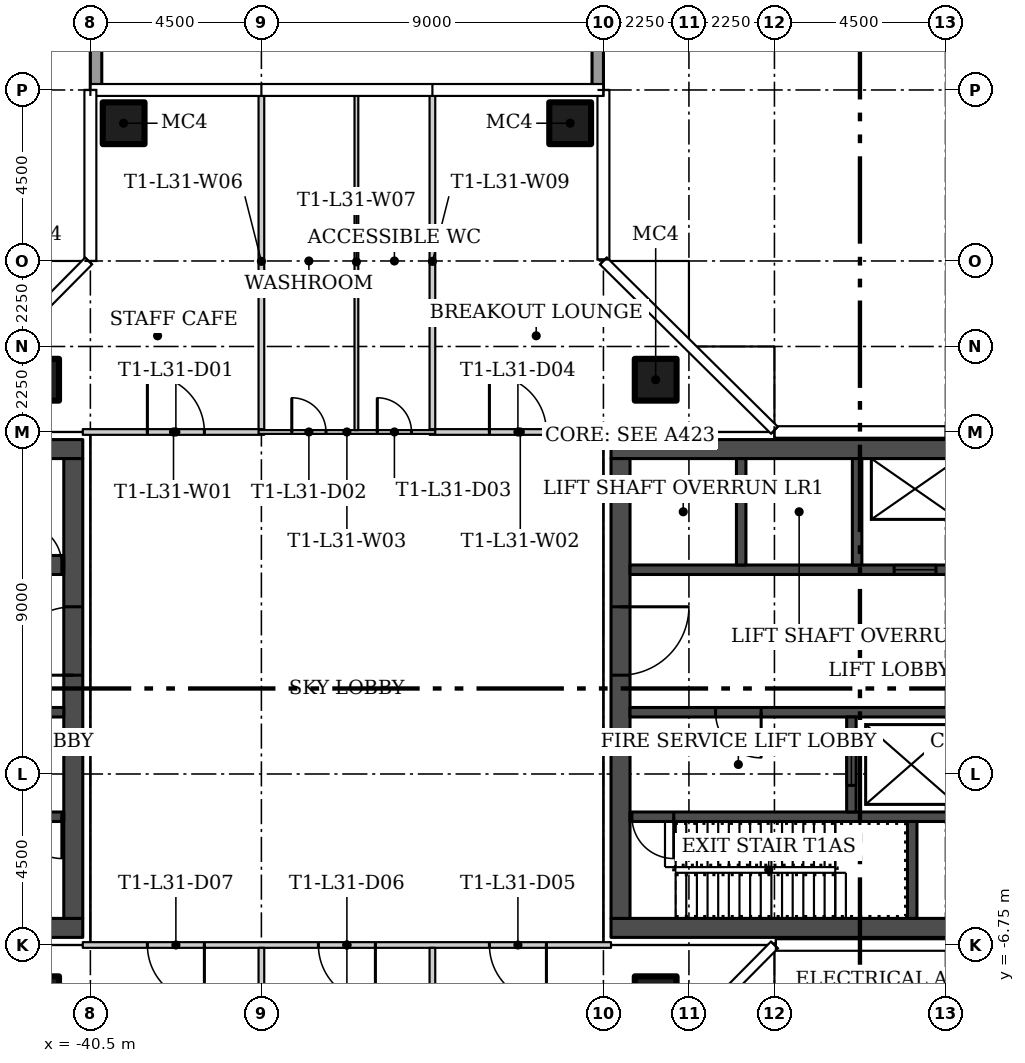
"""IFC4 building model, lengths in metres.
Left out: names, types, materials, properties, quantities, classifications, styles, units other than length and angle.
Written with IfcOpenShell. Run it as: python <this file> out.ifc"""

import sys

from ifc_helpers import new_model, si_unit, direction, frame, frame_2d, origin, origin_2d, place, context, subcontext, project, spatial, rectangle, hollow_rectangle, extrude, element, fill, save


model = new_model("IFC4")
c1 = context("Model", 3, precision=1e-05, world=origin(), true_north=direction((0.0, 1.0)))
c2 = subcontext(c1, "Body", "Model", "MODEL_VIEW")
j1 = project(units=[si_unit("LENGTHUNIT", "METRE"), si_unit("PLANEANGLEUNIT", "RADIAN")], contexts=[c1])
p1 = place(None, origin())
s1 = spatial("IfcSite", under=j1, at=p1, CompositionType="ELEMENT")
p2 = place(p1, origin())
s2 = spatial("IfcBuilding", under=s1, at=p2, CompositionType="ELEMENT")
p3 = place(p2, frame((0.0, 0.0, 133.5)))
s3 = spatial("IfcBuildingStorey", under=s2, at=p3, CompositionType="ELEMENT", Elevation=133.5)
for number, where in (
    (1, (-25.625, 8.125, 0.0)),
    (2, (-25.625, -8.125, 0.0)),
    (3, (-41.875, 8.125, 0.0)),
    (4, (-41.875, -8.125, 0.0)),
    (5, (-39.625, 14.875, 0.0)),
    (6, (-27.875, 14.875, 0.0)),
):
    element("IfcColumn", number, at=place(p3, frame(where)), inside=s3, PredefinedType="COLUMN", context=c2, shape_type="SweptSolid", body=[
        extrude(hollow_rectangle(XDim=1.1, YDim=1.1, WallThickness=0.04, at=origin_2d()), origin(), (0.0, 0.0, 1.0), 5.05),
    ])
p4 = place(p3, frame((-40.7, 6.75, 0.0)))
e7 = element("IfcWall", 7, at=p4, inside=s3, PredefinedType="PARTITIONING", context=c2, shape_type="SweptSolid", body=[
    extrude(rectangle(XDim=4.775, YDim=0.15, at=frame_2d((2.387, 0.0))), origin(), (0.0, 0.0, 1.0), 5.05),
])
p5 = place(p4, frame((1.7, 0.0, 0.0)))
e8 = element("IfcOpeningElement", 8, at=p5, cuts=e7, PredefinedType="OPENING", context=c2, shape_type="SweptSolid", body=[
    extrude(rectangle(XDim=1.5, YDim=2.1, at=frame_2d((0.75, 1.05))), frame((0.0, 0.085, 0.0), z_axis=(0.0, -1.0, 0.0), x_axis=(1.0, 0.0, 0.0)), (0.0, 0.0, 1.0), 0.17),
])
p6 = place(p3, frame((-31.575, 6.75, 0.0)))
e9 = element("IfcWall", 9, at=p6, inside=s3, PredefinedType="PARTITIONING", context=c2, shape_type="SweptSolid", body=[
    extrude(rectangle(XDim=4.775, YDim=0.15, at=frame_2d((2.387, 0.0))), origin(), (0.0, 0.0, 1.0), 5.05),
])
p7 = place(p6, frame((1.575, 0.0, 0.0)))
e10 = element("IfcOpeningElement", 10, at=p7, cuts=e9, PredefinedType="OPENING", context=c2, shape_type="SweptSolid", body=[
    extrude(rectangle(XDim=1.5, YDim=2.1, at=frame_2d((0.75, 1.05))), frame((0.0, 0.085, 0.0), z_axis=(0.0, -1.0, 0.0), x_axis=(1.0, 0.0, 0.0)), (0.0, 0.0, 1.0), 0.17),
])
p8 = place(p3, frame((-36.075, 6.75, 0.0)))
e11 = element("IfcWall", 11, at=p8, inside=s3, PredefinedType="PARTITIONING", context=c2, shape_type="SweptSolid", body=[
    extrude(rectangle(XDim=4.65, YDim=0.1, at=frame_2d((2.325, 0.0))), origin(), (0.0, 0.0, 1.0), 5.05),
])
p9 = place(p8, frame((0.875, 0.0, 0.0)))
e12 = element("IfcOpeningElement", 12, at=p9, cuts=e11, PredefinedType="OPENING", context=c2, shape_type="SweptSolid", body=[
    extrude(rectangle(XDim=0.9, YDim=2.1, at=frame_2d((0.45, 1.05))), frame((0.0, 0.06, 0.0), z_axis=(0.0, -1.0, 0.0), x_axis=(1.0, 0.0, 0.0)), (0.0, 0.0, 1.0), 0.12),
])
p10 = place(p8, frame((3.125, 0.0, 0.0)))
e13 = element("IfcOpeningElement", 13, at=p10, cuts=e11, PredefinedType="OPENING", context=c2, shape_type="SweptSolid", body=[
    extrude(rectangle(XDim=0.9, YDim=2.1, at=frame_2d((0.45, 1.05))), frame((0.0, 0.06, 0.0), z_axis=(0.0, -1.0, 0.0), x_axis=(1.0, 0.0, 0.0)), (0.0, 0.0, 1.0), 0.12),
])
p11 = place(p3, frame((-26.8, -6.75, 0.0), z_axis=(0.0, 0.0, 1.0), x_axis=(-1.0, 0.0, 0.0)))
e14 = element("IfcWall", 14, at=p11, inside=s3, PredefinedType="PARTITIONING", context=c2, shape_type="SweptSolid", body=[
    extrude(rectangle(XDim=13.9, YDim=0.15, at=frame_2d((6.95, 0.0))), origin(), (0.0, 0.0, 1.0), 5.05),
])
p12 = place(p11, frame((1.7, 0.0, 0.0)))
e15 = element("IfcOpeningElement", 15, at=p12, cuts=e14, PredefinedType="OPENING", context=c2, shape_type="SweptSolid", body=[
    extrude(rectangle(XDim=1.5, YDim=2.1, at=frame_2d((0.75, 1.05))), frame((0.0, 0.085, 0.0), z_axis=(0.0, -1.0, 0.0), x_axis=(1.0, 0.0, 0.0)), (0.0, 0.0, 1.0), 0.17),
])
p13 = place(p11, frame((6.2, 0.0, 0.0)))
e16 = element("IfcOpeningElement", 16, at=p13, cuts=e14, PredefinedType="OPENING", context=c2, shape_type="SweptSolid", body=[
    extrude(rectangle(XDim=1.5, YDim=2.1, at=frame_2d((0.75, 1.05))), frame((0.0, 0.085, 0.0), z_axis=(0.0, -1.0, 0.0), x_axis=(1.0, 0.0, 0.0)), (0.0, 0.0, 1.0), 0.17),
])
p14 = place(p11, frame((10.7, 0.0, 0.0)))
e17 = element("IfcOpeningElement", 17, at=p14, cuts=e14, PredefinedType="OPENING", context=c2, shape_type="SweptSolid", body=[
    extrude(rectangle(XDim=1.5, YDim=2.1, at=frame_2d((0.75, 1.05))), frame((0.0, 0.085, 0.0), z_axis=(0.0, -1.0, 0.0), x_axis=(1.0, 0.0, 0.0)), (0.0, 0.0, 1.0), 0.17),
])
p15 = place(p3, frame((-36.0, -20.155, 0.0), z_axis=(0.0, 0.0, 1.0), x_axis=(0.0, 1.0, 0.0)))
e18 = element("IfcWall", 18, at=p15, inside=s3, PredefinedType="PARTITIONING", context=c2, shape_type="SweptSolid", body=[
    extrude(rectangle(XDim=13.33, YDim=0.15, at=frame_2d((6.665, 0.0))), origin(), (0.0, 0.0, 1.0), 5.05),
])
p16 = place(p3, frame((-36.0, 6.825, 0.0), z_axis=(0.0, 0.0, 1.0), x_axis=(0.0, 1.0, 0.0)))
e19 = element("IfcWall", 19, at=p16, inside=s3, PredefinedType="PARTITIONING", context=c2, shape_type="SweptSolid", body=[
    extrude(rectangle(XDim=8.83, YDim=0.15, at=frame_2d((4.415, 0.0))), origin(), (0.0, 0.0, 1.0), 5.05),
])
p17 = place(p3, frame((-33.5, 6.8, 0.0), z_axis=(0.0, 0.0, 1.0), x_axis=(0.0, 1.0, 0.0)))
e20 = element("IfcWall", 20, at=p17, inside=s3, PredefinedType="PARTITIONING", context=c2, shape_type="SweptSolid", body=[
    extrude(rectangle(XDim=8.855, YDim=0.1, at=frame_2d((4.427, 0.0))), origin(), (0.0, 0.0, 1.0), 5.05),
])
p18 = place(p3, frame((-31.5, -20.155, 0.0), z_axis=(0.0, 0.0, 1.0), x_axis=(0.0, 1.0, 0.0)))
e21 = element("IfcWall", 21, at=p18, inside=s3, PredefinedType="PARTITIONING", context=c2, shape_type="SweptSolid", body=[
    extrude(rectangle(XDim=13.33, YDim=0.15, at=frame_2d((6.665, 0.0))), origin(), (0.0, 0.0, 1.0), 5.05),
])
p19 = place(p3, frame((-31.5, 6.825, 0.0), z_axis=(0.0, 0.0, 1.0), x_axis=(0.0, 1.0, 0.0)))
e22 = element("IfcWall", 22, at=p19, inside=s3, PredefinedType="PARTITIONING", context=c2, shape_type="SweptSolid", body=[
    extrude(rectangle(XDim=8.83, YDim=0.15, at=frame_2d((4.415, 0.0))), origin(), (0.0, 0.0, 1.0), 5.05),
])
p20 = place(p3, frame((-27.15, 15.75, 0.0), z_axis=(0.0, 0.0, 1.0), x_axis=(0.0, 1.0, 0.0)))
e23 = element("IfcWall", 23, at=p20, inside=s3, PredefinedType="PARAPET", context=c2, shape_type="SweptSolid", body=[
    extrude(rectangle(XDim=4.5, YDim=0.3, at=frame_2d((2.25, 0.0))), origin(), (0.0, 0.0, 1.0), 1.1),
])
p21 = place(p3, frame((-40.35, 19.95, 0.0), z_axis=(0.0, 0.0, 1.0), x_axis=(0.0, -1.0, 0.0)))
e24 = element("IfcWall", 24, at=p21, inside=s3, PredefinedType="PARAPET", context=c2, shape_type="SweptSolid", body=[
    extrude(rectangle(XDim=4.2, YDim=0.3, at=frame_2d((2.1, 0.0))), origin(), (0.0, 0.0, 1.0), 1.1),
])
for number, where in (
    (25, (-26.8, -6.3, 0.0)),
    (26, (-26.8, 6.3, 0.0)),
):
    element("IfcWall", number, at=place(p3, frame(where)), inside=s3, PredefinedType="SHEAR", context=c2, shape_type="SweptSolid", body=[
        extrude(rectangle(XDim=13.1, YDim=0.5, at=frame_2d((6.55, 0.0))), origin(), (0.0, 0.0, 1.0), 5.05),
    ])
p22 = place(p3, frame((-26.55, 6.05, 0.0), z_axis=(0.0, 0.0, 1.0), x_axis=(0.0, -1.0, 0.0)))
e27 = element("IfcWall", 27, at=p22, inside=s3, PredefinedType="SHEAR", context=c2, shape_type="SweptSolid", body=[
    extrude(rectangle(XDim=12.1, YDim=0.5, at=frame_2d((6.05, 0.0))), origin(), (0.0, 0.0, 1.0), 5.05),
])
p23 = place(p22, frame((3.9, 0.0, 0.0)))
e28 = element("IfcOpeningElement", 28, at=p23, cuts=e27, PredefinedType="OPENING", context=c2, shape_type="SweptSolid", body=[
    extrude(rectangle(XDim=1.8, YDim=2.4, at=frame_2d((0.9, 1.2))), frame((0.0, 0.26, 0.0), z_axis=(0.0, -1.0, 0.0), x_axis=(1.0, 0.0, 0.0)), (0.0, 0.0, 1.0), 0.52),
])
p24 = place(p3, frame((-14.2, -3.375, 0.0), z_axis=(0.0, 0.0, 1.0), x_axis=(-1.0, 0.0, 0.0)))
e29 = element("IfcWall", 29, at=p24, inside=s3, PredefinedType="SHEAR", context=c2, shape_type="SweptSolid", body=[
    extrude(rectangle(XDim=12.1, YDim=0.25, at=frame_2d((6.05, 0.0))), origin(), (0.0, 0.0, 1.0), 5.05),
])
p25 = place(p24, frame((10.95, 0.0, 0.0)))
e30 = element("IfcOpeningElement", 30, at=p25, cuts=e29, PredefinedType="OPENING", context=c2, shape_type="SweptSolid", body=[
    extrude(rectangle(XDim=1.1, YDim=2.1, at=frame_2d((0.55, 1.05))), frame((0.0, 0.135, 0.0), z_axis=(0.0, -1.0, 0.0), x_axis=(1.0, 0.0, 0.0)), (0.0, 0.0, 1.0), 0.27),
])
p26 = place(p3, frame((-18.875, -6.05, 0.0), z_axis=(0.0, 0.0, 1.0), x_axis=(0.0, 1.0, 0.0)))
e31 = element("IfcWall", 31, at=p26, inside=s3, PredefinedType="SHEAR", context=c2, shape_type="SweptSolid", body=[
    extrude(rectangle(XDim=2.55, YDim=0.25, at=frame_2d((1.275, 0.0))), origin(), (0.0, 0.0, 1.0), 5.05),
])
p27 = place(p3, frame((-14.2, -0.625, 0.0), z_axis=(0.0, 0.0, 1.0), x_axis=(-1.0, 0.0, 0.0)))
e32 = element("IfcWall", 32, at=p27, inside=s3, PredefinedType="SHEAR", context=c2, shape_type="SweptSolid", body=[
    extrude(rectangle(XDim=12.1, YDim=0.25, at=frame_2d((6.05, 0.0))), origin(), (0.0, 0.0, 1.0), 5.05),
])
p28 = place(p27, frame((8.65, 0.0, 0.0)))
e33 = element("IfcOpeningElement", 33, at=p28, cuts=e32, PredefinedType="OPENING", context=c2, shape_type="SweptSolid", body=[
    extrude(rectangle(XDim=1.2, YDim=2.1, at=frame_2d((0.6, 1.05))), frame((0.0, 0.135, 0.0), z_axis=(0.0, -1.0, 0.0), x_axis=(1.0, 0.0, 0.0)), (0.0, 0.0, 1.0), 0.27),
])
p29 = place(p27, frame((1.175, 0.0, 0.0)))
e34 = element("IfcOpeningElement", 34, at=p29, cuts=e32, PredefinedType="OPENING", context=c2, shape_type="SweptSolid", body=[
    extrude(rectangle(XDim=0.9, YDim=2.1, at=frame_2d((0.45, 1.05))), frame((0.0, 0.135, 0.0), z_axis=(0.0, -1.0, 0.0), x_axis=(1.0, 0.0, 0.0)), (0.0, 0.0, 1.0), 0.27),
])
p30 = place(p3, frame((-20.475, -3.25, 0.0), z_axis=(0.0, 0.0, 1.0), x_axis=(0.0, 1.0, 0.0)))
e35 = element("IfcWall", 35, at=p30, inside=s3, PredefinedType="SHEAR", context=c2, shape_type="SweptSolid", body=[
    extrude(rectangle(XDim=2.5, YDim=0.25, at=frame_2d((1.25, 0.0))), origin(), (0.0, 0.0, 1.0), 5.05),
])
p31 = place(p30, frame((0.7, 0.0, 0.0)))
e36 = element("IfcOpeningElement", 36, at=p31, cuts=e35, PredefinedType="OPENING", context=c2, shape_type="SweptSolid", body=[
    extrude(rectangle(XDim=1.1, YDim=2.1, at=frame_2d((0.55, 1.05))), frame((0.0, 0.135, 0.0), z_axis=(0.0, -1.0, 0.0), x_axis=(1.0, 0.0, 0.0)), (0.0, 0.0, 1.0), 0.27),
])
p32 = place(p3, frame((-26.3, 3.125, 0.0)))
e37 = element("IfcWall", 37, at=p32, inside=s3, PredefinedType="SHEAR", context=c2, shape_type="SweptSolid", body=[
    extrude(rectangle(XDim=12.1, YDim=0.25, at=frame_2d((6.05, 0.0))), origin(), (0.0, 0.0, 1.0), 5.05),
])
p33 = place(p32, frame((6.95, 0.0, 0.0)))
e38 = element("IfcOpeningElement", 38, at=p33, cuts=e37, PredefinedType="OPENING", context=c2, shape_type="SweptSolid", body=[
    extrude(rectangle(XDim=1.1, YDim=2.1, at=frame_2d((0.55, 1.05))), frame((0.0, 0.135, 0.0), z_axis=(0.0, -1.0, 0.0), x_axis=(1.0, 0.0, 0.0)), (0.0, 0.0, 1.0), 0.27),
])
p34 = place(p32, frame((10.075, 0.0, 0.0)))
e39 = element("IfcOpeningElement", 39, at=p34, cuts=e37, PredefinedType="OPENING", context=c2, shape_type="SweptSolid", body=[
    extrude(rectangle(XDim=1.1, YDim=2.1, at=frame_2d((0.55, 1.05))), frame((0.0, 0.135, 0.0), z_axis=(0.0, -1.0, 0.0), x_axis=(1.0, 0.0, 0.0)), (0.0, 0.0, 1.0), 0.27),
])
for number, where, z_axis, x_axis in (
    (40, (-23.375, 3.25, 0.0), (0.0, 0.0, 1.0), (0.0, 1.0, 0.0)),
    (41, (-20.325, 3.25, 0.0), (0.0, 0.0, 1.0), (0.0, 1.0, 0.0)),
):
    element("IfcWall", number, at=place(p3, frame(where, z_axis=z_axis, x_axis=x_axis)), inside=s3, PredefinedType="SHEAR", context=c2, shape_type="SweptSolid", body=[
        extrude(rectangle(XDim=2.8, YDim=0.25, at=frame_2d((1.4, 0.0))), origin(), (0.0, 0.0, 1.0), 5.05),
    ])
for number, where, z_axis, x_axis in (
    (42, (-40.7, -6.3, 0.0), (0.0, 0.0, 1.0), (-1.0, 0.0, 0.0)),
    (43, (-40.7, 6.3, 0.0), (0.0, 0.0, 1.0), (-1.0, 0.0, 0.0)),
):
    element("IfcWall", number, at=place(p3, frame(where, z_axis=z_axis, x_axis=x_axis)), inside=s3, PredefinedType="SHEAR", context=c2, shape_type="SweptSolid", body=[
        extrude(rectangle(XDim=13.1, YDim=0.5, at=frame_2d((6.55, 0.0))), origin(), (0.0, 0.0, 1.0), 5.05),
    ])
p35 = place(p3, frame((-40.95, -6.05, 0.0), z_axis=(0.0, 0.0, 1.0), x_axis=(0.0, 1.0, 0.0)))
e44 = element("IfcWall", 44, at=p35, inside=s3, PredefinedType="SHEAR", context=c2, shape_type="SweptSolid", body=[
    extrude(rectangle(XDim=12.1, YDim=0.5, at=frame_2d((6.05, 0.0))), origin(), (0.0, 0.0, 1.0), 5.05),
])
p36 = place(p35, frame((6.4, 0.0, 0.0)))
e45 = element("IfcOpeningElement", 45, at=p36, cuts=e44, PredefinedType="OPENING", context=c2, shape_type="SweptSolid", body=[
    extrude(rectangle(XDim=1.8, YDim=2.4, at=frame_2d((0.9, 1.2))), frame((0.0, 0.26, 0.0), z_axis=(0.0, -1.0, 0.0), x_axis=(1.0, 0.0, 0.0)), (0.0, 0.0, 1.0), 0.52),
])
p37 = place(p3, frame((-41.2, -3.375, 0.0), z_axis=(0.0, 0.0, 1.0), x_axis=(-1.0, 0.0, 0.0)))
e46 = element("IfcWall", 46, at=p37, inside=s3, PredefinedType="SHEAR", context=c2, shape_type="SweptSolid", body=[
    extrude(rectangle(XDim=12.1, YDim=0.25, at=frame_2d((6.05, 0.0))), origin(), (0.0, 0.0, 1.0), 5.05),
])
p38 = place(p37, frame((0.05, 0.0, 0.0)))
e47 = element("IfcOpeningElement", 47, at=p38, cuts=e46, PredefinedType="OPENING", context=c2, shape_type="SweptSolid", body=[
    extrude(rectangle(XDim=1.1, YDim=2.1, at=frame_2d((0.55, 1.05))), frame((0.0, 0.135, 0.0), z_axis=(0.0, -1.0, 0.0), x_axis=(1.0, 0.0, 0.0)), (0.0, 0.0, 1.0), 0.27),
])
p39 = place(p3, frame((-41.2, -0.625, 0.0), z_axis=(0.0, 0.0, 1.0), x_axis=(-1.0, 0.0, 0.0)))
e48 = element("IfcWall", 48, at=p39, inside=s3, PredefinedType="SHEAR", context=c2, shape_type="SweptSolid", body=[
    extrude(rectangle(XDim=12.1, YDim=0.25, at=frame_2d((6.05, 0.0))), origin(), (0.0, 0.0, 1.0), 5.05),
])
p40 = place(p39, frame((2.25, 0.0, 0.0)))
e49 = element("IfcOpeningElement", 49, at=p40, cuts=e48, PredefinedType="OPENING", context=c2, shape_type="SweptSolid", body=[
    extrude(rectangle(XDim=1.2, YDim=2.1, at=frame_2d((0.6, 1.05))), frame((0.0, 0.135, 0.0), z_axis=(0.0, -1.0, 0.0), x_axis=(1.0, 0.0, 0.0)), (0.0, 0.0, 1.0), 0.27),
])
p41 = place(p39, frame((10.025, 0.0, 0.0)))
e50 = element("IfcOpeningElement", 50, at=p41, cuts=e48, PredefinedType="OPENING", context=c2, shape_type="SweptSolid", body=[
    extrude(rectangle(XDim=0.9, YDim=2.1, at=frame_2d((0.45, 1.05))), frame((0.0, 0.135, 0.0), z_axis=(0.0, -1.0, 0.0), x_axis=(1.0, 0.0, 0.0)), (0.0, 0.0, 1.0), 0.27),
])
p42 = place(p3, frame((-48.5, 3.25, 0.0)))
e51 = element("IfcWall", 51, at=p42, inside=s3, PredefinedType="SHEAR", context=c2, shape_type="SweptSolid", body=[
    extrude(rectangle(XDim=7.3, YDim=0.5, at=frame_2d((3.65, 0.0))), origin(), (0.0, 0.0, 1.0), 5.05),
])
p43 = place(p42, frame((6.15, 0.0, 0.0)))
e52 = element("IfcOpeningElement", 52, at=p43, cuts=e51, PredefinedType="OPENING", context=c2, shape_type="SweptSolid", body=[
    extrude(rectangle(XDim=1.1, YDim=2.1, at=frame_2d((0.55, 1.05))), frame((0.0, 0.26, 0.0), z_axis=(0.0, -1.0, 0.0), x_axis=(1.0, 0.0, 0.0)), (0.0, 0.0, 1.0), 0.52),
])
p44 = place(p5, origin())
e53 = element("IfcDoor", 53, at=p44, inside=s3, OperationType="DOUBLE_DOOR_SINGLE_SWING", PredefinedType="DOOR", context=c2, shape_type="SweptSolid", body=[
    extrude(rectangle(XDim=1.5, YDim=2.1, at=frame_2d((0.75, 1.05))), frame((0.0, 0.025, 0.0), z_axis=(0.0, -1.0, 0.0), x_axis=(1.0, 0.0, 0.0)), (0.0, 0.0, 1.0), 0.05),
])
fill(e8, e53)
p45 = place(p9, origin())
e54 = element("IfcDoor", 54, at=p45, inside=s3, OperationType="SINGLE_SWING_RIGHT", PredefinedType="DOOR", context=c2, shape_type="SweptSolid", body=[
    extrude(rectangle(XDim=0.9, YDim=2.1, at=frame_2d((0.45, 1.05))), frame((0.0, 0.025, 0.0), z_axis=(0.0, -1.0, 0.0), x_axis=(1.0, 0.0, 0.0)), (0.0, 0.0, 1.0), 0.05),
])
fill(e12, e54)
p46 = place(p10, origin())
e55 = element("IfcDoor", 55, at=p46, inside=s3, OperationType="SINGLE_SWING_LEFT", PredefinedType="DOOR", context=c2, shape_type="SweptSolid", body=[
    extrude(rectangle(XDim=0.9, YDim=2.1, at=frame_2d((0.45, 1.05))), frame((0.0, 0.025, 0.0), z_axis=(0.0, -1.0, 0.0), x_axis=(1.0, 0.0, 0.0)), (0.0, 0.0, 1.0), 0.05),
])
fill(e13, e55)
p47 = place(p7, origin())
e56 = element("IfcDoor", 56, at=p47, inside=s3, OperationType="DOUBLE_DOOR_SINGLE_SWING", PredefinedType="DOOR", context=c2, shape_type="SweptSolid", body=[
    extrude(rectangle(XDim=1.5, YDim=2.1, at=frame_2d((0.75, 1.05))), frame((0.0, 0.025, 0.0), z_axis=(0.0, -1.0, 0.0), x_axis=(1.0, 0.0, 0.0)), (0.0, 0.0, 1.0), 0.05),
])
fill(e10, e56)
p48 = place(p12, origin())
e57 = element("IfcDoor", 57, at=p48, inside=s3, OperationType="DOUBLE_DOOR_SINGLE_SWING", PredefinedType="DOOR", context=c2, shape_type="SweptSolid", body=[
    extrude(rectangle(XDim=1.5, YDim=2.1, at=frame_2d((0.75, 1.05))), frame((0.0, 0.025, 0.0), z_axis=(0.0, -1.0, 0.0), x_axis=(1.0, 0.0, 0.0)), (0.0, 0.0, 1.0), 0.05),
])
fill(e15, e57)
p49 = place(p13, origin())
e58 = element("IfcDoor", 58, at=p49, inside=s3, OperationType="DOUBLE_DOOR_SINGLE_SWING", PredefinedType="DOOR", context=c2, shape_type="SweptSolid", body=[
    extrude(rectangle(XDim=1.5, YDim=2.1, at=frame_2d((0.75, 1.05))), frame((0.0, 0.025, 0.0), z_axis=(0.0, -1.0, 0.0), x_axis=(1.0, 0.0, 0.0)), (0.0, 0.0, 1.0), 0.05),
])
fill(e16, e58)
p50 = place(p14, origin())
e59 = element("IfcDoor", 59, at=p50, inside=s3, OperationType="DOUBLE_DOOR_SINGLE_SWING", PredefinedType="DOOR", context=c2, shape_type="SweptSolid", body=[
    extrude(rectangle(XDim=1.5, YDim=2.1, at=frame_2d((0.75, 1.05))), frame((0.0, 0.025, 0.0), z_axis=(0.0, -1.0, 0.0), x_axis=(1.0, 0.0, 0.0)), (0.0, 0.0, 1.0), 0.05),
])
fill(e17, e59)
p51 = place(p23, origin())
e60 = element("IfcDoor", 60, at=p51, inside=s3, OperationType="DOUBLE_DOOR_SINGLE_SWING", PredefinedType="DOOR", context=c2, shape_type="SweptSolid", body=[
    extrude(rectangle(XDim=1.8, YDim=2.4, at=frame_2d((0.9, 1.2))), frame((0.0, 0.025, 0.0), z_axis=(0.0, -1.0, 0.0), x_axis=(1.0, 0.0, 0.0)), (0.0, 0.0, 1.0), 0.05),
])
fill(e28, e60)
p52 = place(p25, origin())
e61 = element("IfcDoor", 61, at=p52, inside=s3, OperationType="SINGLE_SWING_RIGHT", PredefinedType="DOOR", context=c2, shape_type="SweptSolid", body=[
    extrude(rectangle(XDim=1.1, YDim=2.1, at=frame_2d((0.55, 1.05))), frame((0.0, 0.025, 0.0), z_axis=(0.0, -1.0, 0.0), x_axis=(1.0, 0.0, 0.0)), (0.0, 0.0, 1.0), 0.05),
])
fill(e30, e61)
p53 = place(p28, origin())
e62 = element("IfcDoor", 62, at=p53, inside=s3, OperationType="SINGLE_SWING_RIGHT", PredefinedType="DOOR", context=c2, shape_type="SweptSolid", body=[
    extrude(rectangle(XDim=1.2, YDim=2.1, at=frame_2d((0.6, 1.05))), frame((0.0, 0.025, 0.0), z_axis=(0.0, -1.0, 0.0), x_axis=(1.0, 0.0, 0.0)), (0.0, 0.0, 1.0), 0.05),
])
fill(e33, e62)
p54 = place(p31, origin())
e63 = element("IfcDoor", 63, at=p54, inside=s3, OperationType="SLIDING_TO_LEFT", PredefinedType="DOOR", context=c2, shape_type="SweptSolid", body=[
    extrude(rectangle(XDim=1.1, YDim=2.1, at=frame_2d((0.55, 1.05))), frame((0.0, 0.025, 0.0), z_axis=(0.0, -1.0, 0.0), x_axis=(1.0, 0.0, 0.0)), (0.0, 0.0, 1.0), 0.05),
])
fill(e36, e63)
p55 = place(p33, origin())
e64 = element("IfcDoor", 64, at=p55, inside=s3, OperationType="SLIDING_TO_LEFT", PredefinedType="DOOR", context=c2, shape_type="SweptSolid", body=[
    extrude(rectangle(XDim=1.1, YDim=2.1, at=frame_2d((0.55, 1.05))), frame((0.0, 0.025, 0.0), z_axis=(0.0, -1.0, 0.0), x_axis=(1.0, 0.0, 0.0)), (0.0, 0.0, 1.0), 0.05),
])
fill(e38, e64)
p56 = place(p36, origin())
e65 = element("IfcDoor", 65, at=p56, inside=s3, OperationType="DOUBLE_DOOR_SINGLE_SWING", PredefinedType="DOOR", context=c2, shape_type="SweptSolid", body=[
    extrude(rectangle(XDim=1.8, YDim=2.4, at=frame_2d((0.9, 1.2))), frame((0.0, 0.025, 0.0), z_axis=(0.0, -1.0, 0.0), x_axis=(1.0, 0.0, 0.0)), (0.0, 0.0, 1.0), 0.05),
])
fill(e45, e65)
p57 = place(p38, origin())
e66 = element("IfcDoor", 66, at=p57, inside=s3, OperationType="SINGLE_SWING_LEFT", PredefinedType="DOOR", context=c2, shape_type="SweptSolid", body=[
    extrude(rectangle(XDim=1.1, YDim=2.1, at=frame_2d((0.55, 1.05))), frame((0.0, 0.025, 0.0), z_axis=(0.0, -1.0, 0.0), x_axis=(1.0, 0.0, 0.0)), (0.0, 0.0, 1.0), 0.05),
])
fill(e47, e66)
p58 = place(p43, origin())
e67 = element("IfcDoor", 67, at=p58, inside=s3, OperationType="SINGLE_SWING_RIGHT", PredefinedType="DOOR", context=c2, shape_type="SweptSolid", body=[
    extrude(rectangle(XDim=1.1, YDim=2.1, at=frame_2d((0.55, 1.05))), frame((0.0, 0.025, 0.0), z_axis=(0.0, -1.0, 0.0), x_axis=(1.0, 0.0, 0.0)), (0.0, 0.0, 1.0), 0.05),
])
fill(e52, e67)
save(model, sys.argv[1])
